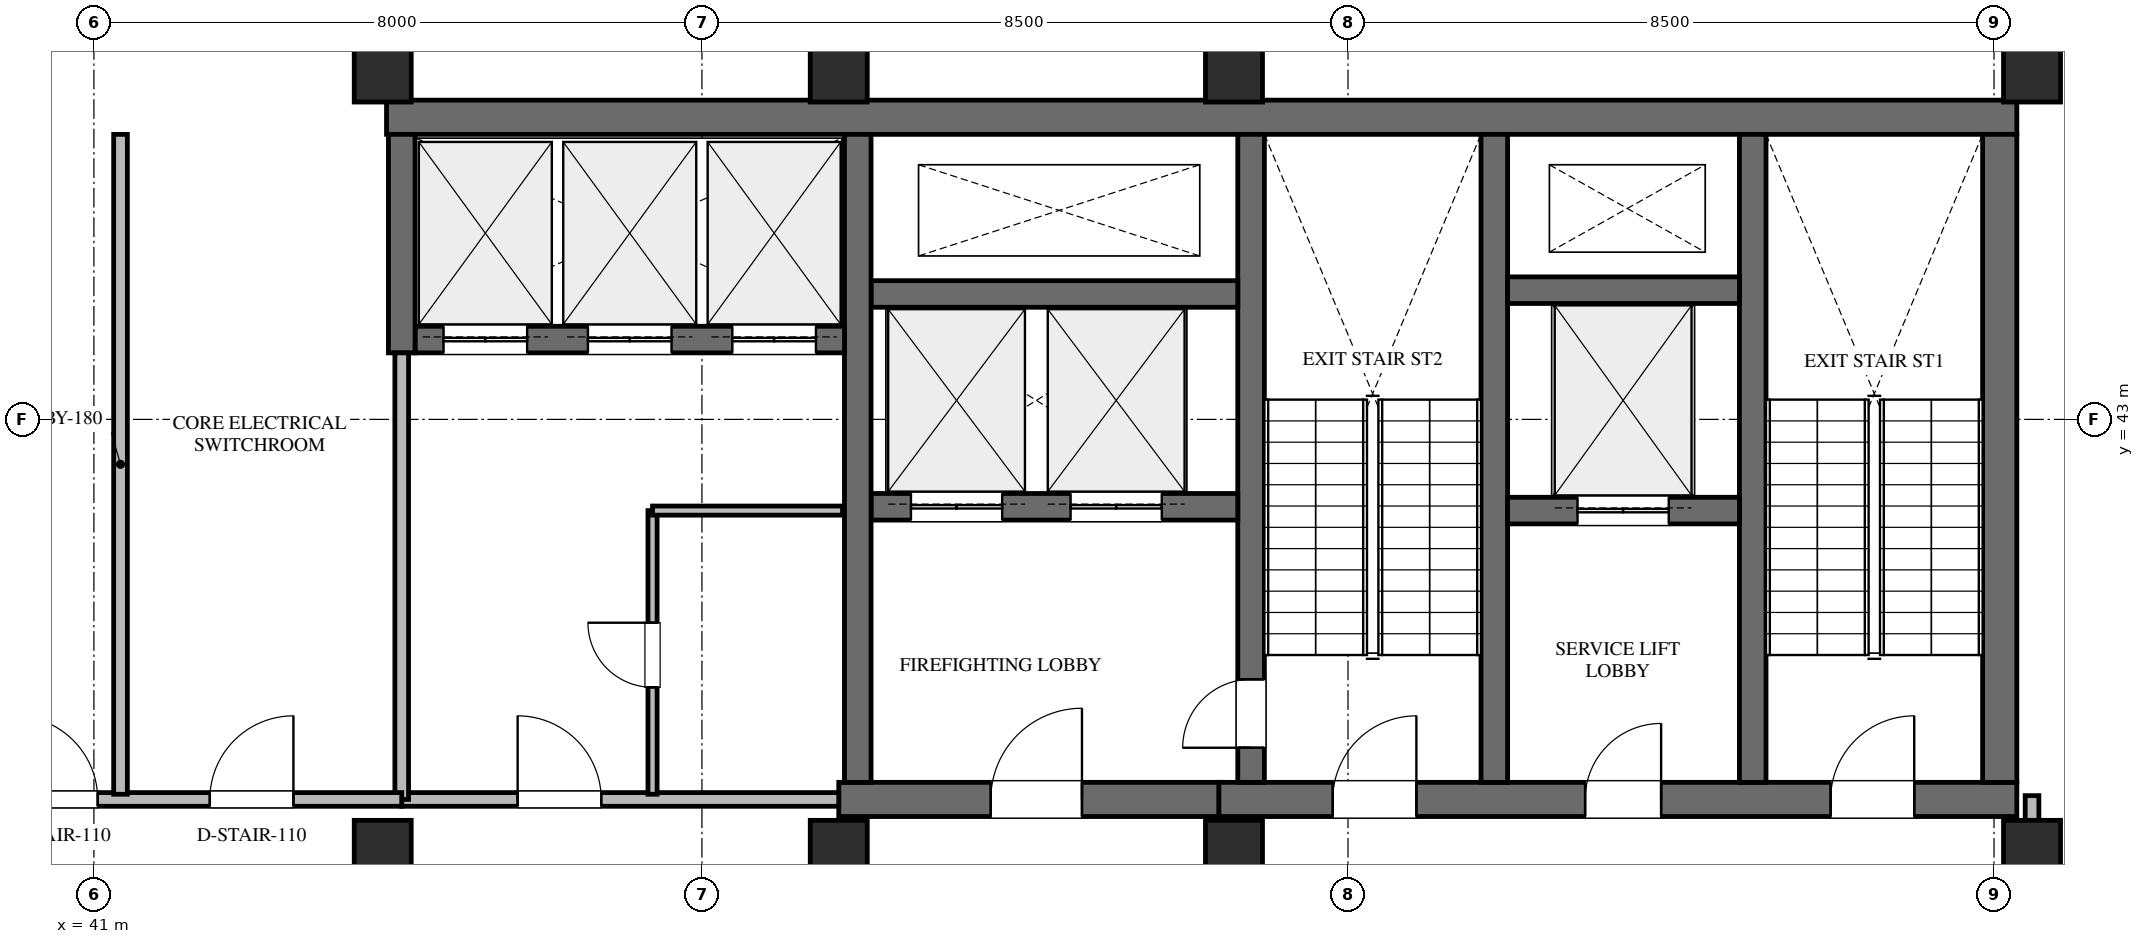
"""IFC4 building model, lengths in metres.
Left out: names, types, materials, properties, quantities, classifications, styles, units other than length and angle.
Written with IfcOpenShell. Run it as: python <this file> out.ifc"""

import sys

from ifc_helpers import new_model, si_unit, direction, frame, frame_2d, origin, origin_2d, place, context, subcontext, project, spatial, rectangle, extrude, element, fill, save


model = new_model("IFC4")
c1 = context("Model", 3, precision=1e-05, world=origin(), true_north=direction((0.0, 1.0)))
c2 = subcontext(c1, "Body", "Model", "MODEL_VIEW")
j1 = project(units=[si_unit("LENGTHUNIT", "METRE"), si_unit("PLANEANGLEUNIT", "RADIAN")], contexts=[c1])
p1 = place(None, origin())
s1 = spatial("IfcSite", under=j1, at=p1, CompositionType="ELEMENT")
p2 = place(p1, origin())
s2 = spatial("IfcBuilding", under=s1, at=p2, CompositionType="ELEMENT")
p3 = place(p2, frame((0.0, 0.0, 277.8)))
s3 = spatial("IfcBuildingStorey", under=s2, at=p3, CompositionType="ELEMENT", Elevation=277.8)
p4 = place(p3, frame((44.85, 46.975, 0.0), z_axis=(0.0, 0.0, 1.0), x_axis=(1.0, 0.0, 0.0)))
e1 = element("IfcWall", 1, at=p4, inside=s3, PredefinedType="SHEAR", context=c2, shape_type="SweptSolid", body=[
    extrude(rectangle(XDim=21.45, YDim=0.45, at=frame_2d((10.725, 0.0))), origin(), (0.0, 0.0, 1.0), 4.5),
])
p5 = place(p3, frame((55.8, 38.0, 0.0), z_axis=(0.0, 0.0, 1.0), x_axis=(1.0, 0.0, 0.0)))
e2 = element("IfcWall", 2, at=p5, inside=s3, PredefinedType="SHEAR", context=c2, shape_type="SweptSolid", body=[
    extrude(rectangle(XDim=10.5, YDim=0.45, at=frame_2d((5.25, 0.0))), origin(), (0.0, 0.0, 1.0), 4.5),
])
p6 = place(p5, frame((1.5, 0.0, 0.0)))
e3 = element("IfcOpeningElement", 3, at=p6, cuts=e2, PredefinedType="OPENING", context=c2, shape_type="SweptSolid", body=[
    extrude(rectangle(XDim=1.1, YDim=2.2, at=frame_2d((0.55, 1.1))), frame((0.0, 0.235, 0.0), z_axis=(0.0, -1.0, 0.0), x_axis=(1.0, 0.0, 0.0)), (0.0, 0.0, 1.0), 0.47),
])
p7 = place(p5, frame((4.82, 0.0, 0.0)))
e4 = element("IfcOpeningElement", 4, at=p7, cuts=e2, PredefinedType="OPENING", context=c2, shape_type="SweptSolid", body=[
    extrude(rectangle(XDim=1.0, YDim=2.15, at=frame_2d((0.5, 1.075))), frame((0.0, 0.235, 0.0), z_axis=(0.0, -1.0, 0.0), x_axis=(1.0, 0.0, 0.0)), (0.0, 0.0, 1.0), 0.47),
])
p8 = place(p5, frame((8.05, 0.0, 0.0)))
e5 = element("IfcOpeningElement", 5, at=p8, cuts=e2, PredefinedType="OPENING", context=c2, shape_type="SweptSolid", body=[
    extrude(rectangle(XDim=1.1, YDim=2.2, at=frame_2d((0.55, 1.1))), frame((0.0, 0.235, 0.0), z_axis=(0.0, -1.0, 0.0), x_axis=(1.0, 0.0, 0.0)), (0.0, 0.0, 1.0), 0.47),
])
p9 = place(p3, frame((66.075, 38.225, 0.0), z_axis=(0.0, 0.0, 1.0), x_axis=(0.0, 1.0, 0.0)))
e6 = element("IfcWall", 6, at=p9, inside=s3, PredefinedType="SHEAR", context=c2, shape_type="SweptSolid", body=[
    extrude(rectangle(XDim=8.525, YDim=0.45, at=frame_2d((4.262, 0.0))), origin(), (0.0, 0.0, 1.0), 4.5),
])
for number, where, z_axis, x_axis in (
    (7, (62.825, 38.225, 0.0), (0.0, 0.0, 1.0), (0.0, 1.0, 0.0)),
    (8, (59.425, 38.225, 0.0), (0.0, 0.0, 1.0), (0.0, 1.0, 0.0)),
):
    element("IfcWall", number, at=place(p3, frame(where, z_axis=z_axis, x_axis=x_axis)), inside=s3, PredefinedType="SHEAR", context=c2, shape_type="SweptSolid", body=[
        extrude(rectangle(XDim=8.525, YDim=0.35, at=frame_2d((4.262, 0.0))), origin(), (0.0, 0.0, 1.0), 4.5),
    ])
p10 = place(p3, frame((56.225, 38.225, 0.0), z_axis=(0.0, 0.0, 1.0), x_axis=(0.0, 1.0, 0.0)))
e9 = element("IfcWall", 9, at=p10, inside=s3, PredefinedType="SHEAR", context=c2, shape_type="SweptSolid", body=[
    extrude(rectangle(XDim=8.525, YDim=0.35, at=frame_2d((4.262, 0.0))), origin(), (0.0, 0.0, 1.0), 4.5),
])
p11 = place(p10, frame((0.455, 0.0, 0.0)))
e10 = element("IfcOpeningElement", 10, at=p11, cuts=e9, PredefinedType="OPENING", context=c2, shape_type="SweptSolid", body=[
    extrude(rectangle(XDim=0.9, YDim=2.15, at=frame_2d((0.45, 1.075))), frame((0.0, 0.185, 0.0), z_axis=(0.0, -1.0, 0.0), x_axis=(1.0, 0.0, 0.0)), (0.0, 0.0, 1.0), 0.37),
])
p12 = place(p3, frame((59.6, 41.8, 0.0), z_axis=(0.0, 0.0, 1.0), x_axis=(1.0, 0.0, 0.0)))
e11 = element("IfcWall", 11, at=p12, inside=s3, PredefinedType="SHEAR", context=c2, shape_type="SweptSolid", body=[
    extrude(rectangle(XDim=3.05, YDim=0.35, at=frame_2d((1.525, 0.0))), origin(), (0.0, 0.0, 1.0), 4.5),
])
p13 = place(p12, frame((0.92, 0.0, 0.0)))
e12 = element("IfcOpeningElement", 12, at=p13, cuts=e11, PredefinedType="OPENING", context=c2, shape_type="SweptSolid", body=[
    extrude(rectangle(XDim=1.2, YDim=2.2, at=frame_2d((0.6, 1.1))), frame((0.0, 0.185, 0.0), z_axis=(0.0, -1.0, 0.0), x_axis=(1.0, 0.0, 0.0)), (0.0, 0.0, 1.0), 0.37),
])
p14 = place(p3, frame((59.6, 44.7, 0.0), z_axis=(0.0, 0.0, 1.0), x_axis=(1.0, 0.0, 0.0)))
e13 = element("IfcWall", 13, at=p14, inside=s3, PredefinedType="SHEAR", context=c2, shape_type="SweptSolid", body=[
    extrude(rectangle(XDim=3.05, YDim=0.35, at=frame_2d((1.525, 0.0))), origin(), (0.0, 0.0, 1.0), 4.5),
])
p15 = place(p3, frame((50.8, 38.0, 0.0), z_axis=(0.0, 0.0, 1.0), x_axis=(1.0, 0.0, 0.0)))
e14 = element("IfcWall", 14, at=p15, inside=s3, PredefinedType="SHEAR", context=c2, shape_type="SweptSolid", body=[
    extrude(rectangle(XDim=5.0, YDim=0.45, at=frame_2d((2.5, 0.0))), origin(), (0.0, 0.0, 1.0), 4.5),
])
p16 = place(p15, frame((2.0, 0.0, 0.0)))
e15 = element("IfcOpeningElement", 15, at=p16, cuts=e14, PredefinedType="OPENING", context=c2, shape_type="SweptSolid", body=[
    extrude(rectangle(XDim=1.2, YDim=2.2, at=frame_2d((0.6, 1.1))), frame((0.0, 0.235, 0.0), z_axis=(0.0, -1.0, 0.0), x_axis=(1.0, 0.0, 0.0)), (0.0, 0.0, 1.0), 0.47),
])
p17 = place(p3, frame((51.225, 41.85, 0.0), z_axis=(0.0, 0.0, 1.0), x_axis=(1.0, 0.0, 0.0)))
e16 = element("IfcWall", 16, at=p17, inside=s3, PredefinedType="SHEAR", context=c2, shape_type="SweptSolid", body=[
    extrude(rectangle(XDim=4.825, YDim=0.35, at=frame_2d((2.413, 0.0))), origin(), (0.0, 0.0, 1.0), 4.5),
])
p18 = place(p17, frame((0.525, 0.0, 0.0)))
e17 = element("IfcOpeningElement", 17, at=p18, cuts=e16, PredefinedType="OPENING", context=c2, shape_type="SweptSolid", body=[
    extrude(rectangle(XDim=1.2, YDim=2.2, at=frame_2d((0.6, 1.1))), frame((0.0, 0.185, 0.0), z_axis=(0.0, -1.0, 0.0), x_axis=(1.0, 0.0, 0.0)), (0.0, 0.0, 1.0), 0.37),
])
p19 = place(p17, frame((2.625, 0.0, 0.0)))
e18 = element("IfcOpeningElement", 18, at=p19, cuts=e16, PredefinedType="OPENING", context=c2, shape_type="SweptSolid", body=[
    extrude(rectangle(XDim=1.2, YDim=2.2, at=frame_2d((0.6, 1.1))), frame((0.0, 0.185, 0.0), z_axis=(0.0, -1.0, 0.0), x_axis=(1.0, 0.0, 0.0)), (0.0, 0.0, 1.0), 0.37),
])
p20 = place(p3, frame((51.225, 44.65, 0.0), z_axis=(0.0, 0.0, 1.0), x_axis=(1.0, 0.0, 0.0)))
e19 = element("IfcWall", 19, at=p20, inside=s3, PredefinedType="SHEAR", context=c2, shape_type="SweptSolid", body=[
    extrude(rectangle(XDim=4.825, YDim=0.35, at=frame_2d((2.413, 0.0))), origin(), (0.0, 0.0, 1.0), 4.5),
])
p21 = place(p3, frame((51.05, 38.225, 0.0), z_axis=(0.0, 0.0, 1.0), x_axis=(0.0, 1.0, 0.0)))
e20 = element("IfcWall", 20, at=p21, inside=s3, PredefinedType="SHEAR", context=c2, shape_type="SweptSolid", body=[
    extrude(rectangle(XDim=8.525, YDim=0.35, at=frame_2d((4.262, 0.0))), origin(), (0.0, 0.0, 1.0), 4.5),
])
p22 = place(p3, frame((45.225, 44.05, 0.0), z_axis=(0.0, 0.0, 1.0), x_axis=(1.0, 0.0, 0.0)))
e21 = element("IfcWall", 21, at=p22, inside=s3, PredefinedType="SHEAR", context=c2, shape_type="SweptSolid", body=[
    extrude(rectangle(XDim=5.65, YDim=0.35, at=frame_2d((2.825, 0.0))), origin(), (0.0, 0.0, 1.0), 4.5),
])
p23 = place(p22, frame((0.375, 0.0, 0.0)))
e22 = element("IfcOpeningElement", 22, at=p23, cuts=e21, PredefinedType="OPENING", context=c2, shape_type="SweptSolid", body=[
    extrude(rectangle(XDim=1.1, YDim=2.2, at=frame_2d((0.55, 1.1))), frame((0.0, 0.185, 0.0), z_axis=(0.0, -1.0, 0.0), x_axis=(1.0, 0.0, 0.0)), (0.0, 0.0, 1.0), 0.37),
])
p24 = place(p22, frame((2.275, 0.0, 0.0)))
e23 = element("IfcOpeningElement", 23, at=p24, cuts=e21, PredefinedType="OPENING", context=c2, shape_type="SweptSolid", body=[
    extrude(rectangle(XDim=1.1, YDim=2.2, at=frame_2d((0.55, 1.1))), frame((0.0, 0.185, 0.0), z_axis=(0.0, -1.0, 0.0), x_axis=(1.0, 0.0, 0.0)), (0.0, 0.0, 1.0), 0.37),
])
p25 = place(p22, frame((4.175, 0.0, 0.0)))
e24 = element("IfcOpeningElement", 24, at=p25, cuts=e21, PredefinedType="OPENING", context=c2, shape_type="SweptSolid", body=[
    extrude(rectangle(XDim=1.1, YDim=2.2, at=frame_2d((0.55, 1.1))), frame((0.0, 0.185, 0.0), z_axis=(0.0, -1.0, 0.0), x_axis=(1.0, 0.0, 0.0)), (0.0, 0.0, 1.0), 0.37),
])
p26 = place(p3, frame((45.05, 43.875, 0.0), z_axis=(0.0, 0.0, 1.0), x_axis=(0.0, 1.0, 0.0)))
e25 = element("IfcWall", 25, at=p26, inside=s3, PredefinedType="SHEAR", context=c2, shape_type="SweptSolid", body=[
    extrude(rectangle(XDim=2.875, YDim=0.35, at=frame_2d((1.438, 0.0))), origin(), (0.0, 0.0, 1.0), 4.5),
])
for number, where, z_axis, x_axis in (
    (26, (66.5, 47.55, 0.0), (0.0, 0.0, 1.0), (1.0, 0.0, 0.0)),
    (27, (56.0, 47.55, 0.0), (0.0, 0.0, 1.0), (1.0, 0.0, 0.0)),
    (28, (66.5, 37.35, 0.0), (0.0, 0.0, 1.0), (1.0, 0.0, 0.0)),
    (29, (56.0, 37.35, 0.0), (0.0, 0.0, 1.0), (1.0, 0.0, 0.0)),
    (30, (50.8, 47.55, 0.0), (0.0, 0.0, 1.0), (1.0, 0.0, 0.0)),
    (31, (50.8, 37.35, 0.0), (0.0, 0.0, 1.0), (1.0, 0.0, 0.0)),
    (32, (44.8, 37.35, 0.0), (0.0, 0.0, 1.0), (1.0, 0.0, 0.0)),
    (33, (44.8, 47.55, 0.0), (0.0, 0.0, 1.0), (1.0, 0.0, 0.0)),
):
    element("IfcColumn", number, at=place(p3, frame(where, z_axis=z_axis, x_axis=x_axis)), inside=s3, PredefinedType="COLUMN", context=c2, shape_type="SweptSolid", body=[
        extrude(rectangle(XDim=0.75, YDim=0.75, at=origin_2d()), origin(), (0.0, 0.0, 1.0), 4.5),
    ])
p27 = place(p3, frame((68.355, 37.8, 0.0), z_axis=(0.0, 0.0, 1.0), x_axis=(-0.139183833681, -0.990266560297, 0.0)))
e34 = element("IfcWall", 34, at=p27, inside=s3, PredefinedType="STANDARD", context=c2, shape_type="SweptSolid", body=[
    extrude(rectangle(XDim=16.913, YDim=0.28, at=frame_2d((8.457, 0.0))), origin(), (0.0, 0.0, 1.0), 4.265),
])
p28 = place(p3, frame((45.05, 38.0, 0.0), z_axis=(0.0, 0.0, 1.0), x_axis=(1.0, 0.0, 0.0)))
e35 = element("IfcWall", 35, at=p28, inside=s3, PredefinedType="STANDARD", context=c2, shape_type="SweptSolid", body=[
    extrude(rectangle(XDim=5.75, YDim=0.18, at=frame_2d((2.875, 0.0))), origin(), (0.0, 0.0, 1.0), 3.654),
])
p29 = place(p28, frame((1.525, 0.0, 0.0)))
e36 = element("IfcOpeningElement", 36, at=p29, cuts=e35, PredefinedType="OPENING", context=c2, shape_type="SweptSolid", body=[
    extrude(rectangle(XDim=1.1, YDim=2.2, at=frame_2d((0.55, 1.1))), frame((0.0, 0.1, 0.0), z_axis=(0.0, -1.0, 0.0), x_axis=(1.0, 0.0, 0.0)), (0.0, 0.0, 1.0), 0.2),
])
p30 = place(p3, frame((48.35, 38.068, 0.0), z_axis=(0.0, 0.0, 1.0), x_axis=(0.0, 1.0, 0.0)))
e37 = element("IfcWall", 37, at=p30, inside=s3, PredefinedType="PARTITIONING", context=c2, shape_type="SweptSolid", body=[
    extrude(rectangle(XDim=3.732, YDim=0.12, at=frame_2d((1.866, 0.0))), origin(), (0.0, 0.0, 1.0), 4.265),
])
p31 = place(p30, frame((1.407, 0.0, 0.0)))
e38 = element("IfcOpeningElement", 38, at=p31, cuts=e37, PredefinedType="OPENING", context=c2, shape_type="SweptSolid", body=[
    extrude(rectangle(XDim=0.85, YDim=2.1, at=frame_2d((0.425, 1.05))), frame((0.0, 0.07, 0.0), z_axis=(0.0, -1.0, 0.0), x_axis=(1.0, 0.0, 0.0)), (0.0, 0.0, 1.0), 0.14),
])
p32 = place(p3, frame((48.35, 41.8, 0.0), z_axis=(0.0, 0.0, 1.0), x_axis=(1.0, 0.0, 0.0)))
e39 = element("IfcWall", 39, at=p32, inside=s3, PredefinedType="PARTITIONING", context=c2, shape_type="SweptSolid", body=[
    extrude(rectangle(XDim=2.5, YDim=0.12, at=frame_2d((1.25, 0.0))), origin(), (0.0, 0.0, 1.0), 3.654),
])
p33 = place(p3, frame((45.05, 38.0, 0.0), z_axis=(0.0, 0.0, 1.0), x_axis=(0.0, 1.0, 0.0)))
e40 = element("IfcWall", 40, at=p33, inside=s3, PredefinedType="STANDARD", context=c2, shape_type="SweptSolid", body=[
    extrude(rectangle(XDim=5.875, YDim=0.18, at=frame_2d((2.938, 0.0))), origin(), (0.0, 0.0, 1.0), 3.654),
])
p34 = place(p3, frame((31.805, 38.0, 0.0), z_axis=(0.0, 0.0, 1.0), x_axis=(1.0, 0.0, 0.0)))
e41 = element("IfcWall", 41, at=p34, inside=s3, PredefinedType="STANDARD", context=c2, shape_type="SweptSolid", body=[
    extrude(rectangle(XDim=13.245, YDim=0.18, at=frame_2d((6.623, 0.0))), origin(), (0.0, 0.0, 1.0), 3.654),
])
p35 = place(p34, frame((8.145, 0.0, 0.0)))
e42 = element("IfcOpeningElement", 42, at=p35, cuts=e41, PredefinedType="OPENING", context=c2, shape_type="SweptSolid", body=[
    extrude(rectangle(XDim=1.1, YDim=2.2, at=frame_2d((0.55, 1.1))), frame((0.0, 0.1, 0.0), z_axis=(0.0, -1.0, 0.0), x_axis=(1.0, 0.0, 0.0)), (0.0, 0.0, 1.0), 0.2),
])
p36 = place(p34, frame((10.72, 0.0, 0.0)))
e43 = element("IfcOpeningElement", 43, at=p36, cuts=e41, PredefinedType="OPENING", context=c2, shape_type="SweptSolid", body=[
    extrude(rectangle(XDim=1.1, YDim=2.2, at=frame_2d((0.55, 1.1))), frame((0.0, 0.1, 0.0), z_axis=(0.0, -1.0, 0.0), x_axis=(1.0, 0.0, 0.0)), (0.0, 0.0, 1.0), 0.2),
])
p37 = place(p3, frame((41.35, 38.068, 0.0), z_axis=(0.0, 0.0, 1.0), x_axis=(0.0, 1.0, 0.0)))
e44 = element("IfcWall", 44, at=p37, inside=s3, PredefinedType="STANDARD", context=c2, shape_type="SweptSolid", body=[
    extrude(rectangle(XDim=8.682, YDim=0.18, at=frame_2d((4.341, 0.0))), origin(), (0.0, 0.0, 1.0), 4.265),
])
p38 = place(p3, frame((66.5, 34.468, 0.0), z_axis=(0.0, 0.0, 1.0), x_axis=(0.0, 1.0, 0.0)))
e45 = element("IfcWall", 45, at=p38, inside=s3, PredefinedType="STANDARD", context=c2, shape_type="SweptSolid", body=[
    extrude(rectangle(XDim=3.582, YDim=0.18, at=frame_2d((1.791, 0.0))), origin(), (0.0, 0.0, 1.0), 3.654),
])
p39 = place(p6, origin())
e46 = element("IfcDoor", 46, at=p39, inside=s3, OperationType="SINGLE_SWING_RIGHT", PredefinedType="DOOR", context=c2, shape_type="SweptSolid", body=[
    extrude(rectangle(XDim=1.1, YDim=2.2, at=frame_2d((0.55, 1.1))), frame((0.0, 0.025, 0.0), z_axis=(0.0, -1.0, 0.0), x_axis=(1.0, 0.0, 0.0)), (0.0, 0.0, 1.0), 0.05),
])
fill(e3, e46)
p40 = place(p7, origin())
e47 = element("IfcDoor", 47, at=p40, inside=s3, OperationType="SINGLE_SWING_RIGHT", PredefinedType="DOOR", context=c2, shape_type="SweptSolid", body=[
    extrude(rectangle(XDim=1.0, YDim=2.15, at=frame_2d((0.5, 1.075))), frame((0.0, 0.025, 0.0), z_axis=(0.0, -1.0, 0.0), x_axis=(1.0, 0.0, 0.0)), (0.0, 0.0, 1.0), 0.05),
])
fill(e4, e47)
p41 = place(p8, origin())
e48 = element("IfcDoor", 48, at=p41, inside=s3, OperationType="SINGLE_SWING_RIGHT", PredefinedType="DOOR", context=c2, shape_type="SweptSolid", body=[
    extrude(rectangle(XDim=1.1, YDim=2.2, at=frame_2d((0.55, 1.1))), frame((0.0, 0.025, 0.0), z_axis=(0.0, -1.0, 0.0), x_axis=(1.0, 0.0, 0.0)), (0.0, 0.0, 1.0), 0.05),
])
fill(e5, e48)
p42 = place(p16, origin())
e49 = element("IfcDoor", 49, at=p42, inside=s3, OperationType="SINGLE_SWING_RIGHT", PredefinedType="DOOR", context=c2, shape_type="SweptSolid", body=[
    extrude(rectangle(XDim=1.2, YDim=2.2, at=frame_2d((0.6, 1.1))), frame((0.0, 0.025, 0.0), z_axis=(0.0, -1.0, 0.0), x_axis=(1.0, 0.0, 0.0)), (0.0, 0.0, 1.0), 0.05),
])
fill(e15, e49)
p43 = place(p11, origin())
e50 = element("IfcDoor", 50, at=p43, inside=s3, OperationType="SINGLE_SWING_LEFT", PredefinedType="DOOR", context=c2, shape_type="SweptSolid", body=[
    extrude(rectangle(XDim=0.9, YDim=2.15, at=frame_2d((0.45, 1.075))), frame((0.0, 0.025, 0.0), z_axis=(0.0, -1.0, 0.0), x_axis=(1.0, 0.0, 0.0)), (0.0, 0.0, 1.0), 0.05),
])
fill(e10, e50)
p44 = place(p23, origin())
e51 = element("IfcDoor", 51, at=p44, inside=s3, OperationType="DOUBLE_DOOR_SLIDING", PredefinedType="DOOR", context=c2, shape_type="SweptSolid", body=[
    extrude(rectangle(XDim=1.1, YDim=2.2, at=frame_2d((0.55, 1.1))), frame((0.0, 0.025, 0.0), z_axis=(0.0, -1.0, 0.0), x_axis=(1.0, 0.0, 0.0)), (0.0, 0.0, 1.0), 0.05),
])
fill(e22, e51)
p45 = place(p24, origin())
e52 = element("IfcDoor", 52, at=p45, inside=s3, OperationType="DOUBLE_DOOR_SLIDING", PredefinedType="DOOR", context=c2, shape_type="SweptSolid", body=[
    extrude(rectangle(XDim=1.1, YDim=2.2, at=frame_2d((0.55, 1.1))), frame((0.0, 0.025, 0.0), z_axis=(0.0, -1.0, 0.0), x_axis=(1.0, 0.0, 0.0)), (0.0, 0.0, 1.0), 0.05),
])
fill(e23, e52)
p46 = place(p25, origin())
e53 = element("IfcDoor", 53, at=p46, inside=s3, OperationType="DOUBLE_DOOR_SLIDING", PredefinedType="DOOR", context=c2, shape_type="SweptSolid", body=[
    extrude(rectangle(XDim=1.1, YDim=2.2, at=frame_2d((0.55, 1.1))), frame((0.0, 0.025, 0.0), z_axis=(0.0, -1.0, 0.0), x_axis=(1.0, 0.0, 0.0)), (0.0, 0.0, 1.0), 0.05),
])
fill(e24, e53)
p47 = place(p18, origin())
e54 = element("IfcDoor", 54, at=p47, inside=s3, OperationType="DOUBLE_DOOR_SLIDING", PredefinedType="DOOR", context=c2, shape_type="SweptSolid", body=[
    extrude(rectangle(XDim=1.2, YDim=2.2, at=frame_2d((0.6, 1.1))), frame((0.0, 0.025, 0.0), z_axis=(0.0, -1.0, 0.0), x_axis=(1.0, 0.0, 0.0)), (0.0, 0.0, 1.0), 0.05),
])
fill(e17, e54)
p48 = place(p19, origin())
e55 = element("IfcDoor", 55, at=p48, inside=s3, OperationType="DOUBLE_DOOR_SLIDING", PredefinedType="DOOR", context=c2, shape_type="SweptSolid", body=[
    extrude(rectangle(XDim=1.2, YDim=2.2, at=frame_2d((0.6, 1.1))), frame((0.0, 0.025, 0.0), z_axis=(0.0, -1.0, 0.0), x_axis=(1.0, 0.0, 0.0)), (0.0, 0.0, 1.0), 0.05),
])
fill(e18, e55)
p49 = place(p13, origin())
e56 = element("IfcDoor", 56, at=p49, inside=s3, OperationType="DOUBLE_DOOR_SLIDING", PredefinedType="DOOR", context=c2, shape_type="SweptSolid", body=[
    extrude(rectangle(XDim=1.2, YDim=2.2, at=frame_2d((0.6, 1.1))), frame((0.0, 0.025, 0.0), z_axis=(0.0, -1.0, 0.0), x_axis=(1.0, 0.0, 0.0)), (0.0, 0.0, 1.0), 0.05),
])
fill(e12, e56)
p50 = place(p29, origin())
e57 = element("IfcDoor", 57, at=p50, inside=s3, OperationType="SINGLE_SWING_LEFT", PredefinedType="DOOR", context=c2, shape_type="SweptSolid", body=[
    extrude(rectangle(XDim=1.1, YDim=2.2, at=frame_2d((0.55, 1.1))), frame((0.0, 0.025, 0.0), z_axis=(0.0, -1.0, 0.0), x_axis=(1.0, 0.0, 0.0)), (0.0, 0.0, 1.0), 0.05),
])
fill(e36, e57)
p51 = place(p31, origin())
e58 = element("IfcDoor", 58, at=p51, inside=s3, OperationType="SINGLE_SWING_RIGHT", PredefinedType="DOOR", context=c2, shape_type="SweptSolid", body=[
    extrude(rectangle(XDim=0.85, YDim=2.1, at=frame_2d((0.425, 1.05))), frame((0.0, 0.025, 0.0), z_axis=(0.0, -1.0, 0.0), x_axis=(1.0, 0.0, 0.0)), (0.0, 0.0, 1.0), 0.05),
])
fill(e38, e58)
p52 = place(p35, origin())
e59 = element("IfcDoor", 59, at=p52, inside=s3, OperationType="SINGLE_SWING_LEFT", PredefinedType="DOOR", context=c2, shape_type="SweptSolid", body=[
    extrude(rectangle(XDim=1.1, YDim=2.2, at=frame_2d((0.55, 1.1))), frame((0.0, 0.025, 0.0), z_axis=(0.0, -1.0, 0.0), x_axis=(1.0, 0.0, 0.0)), (0.0, 0.0, 1.0), 0.05),
])
fill(e42, e59)
p53 = place(p36, origin())
e60 = element("IfcDoor", 60, at=p53, inside=s3, OperationType="SINGLE_SWING_RIGHT", PredefinedType="DOOR", context=c2, shape_type="SweptSolid", body=[
    extrude(rectangle(XDim=1.1, YDim=2.2, at=frame_2d((0.55, 1.1))), frame((0.0, 0.025, 0.0), z_axis=(0.0, -1.0, 0.0), x_axis=(1.0, 0.0, 0.0)), (0.0, 0.0, 1.0), 0.05),
])
fill(e43, e60)
save(model, sys.argv[1])
